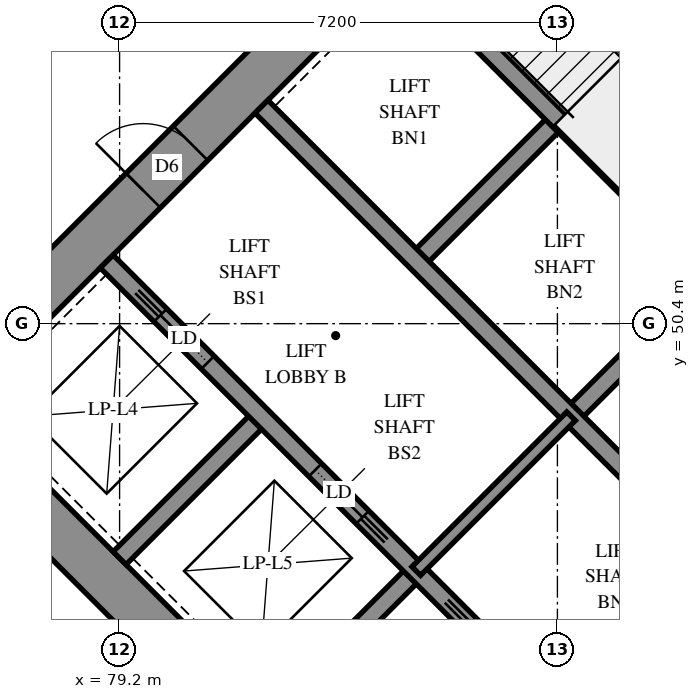
"""IFC4 building model, lengths in metres.
Left out: names, types, materials, properties, quantities, classifications, styles, units other than length and angle.
Written with IfcOpenShell. Run it as: python <this file> out.ifc"""

import sys

from ifc_helpers import new_model, si_unit, direction, frame, frame_2d, origin, place, context, subcontext, project, spatial, rectangle, extrude, element, fill, save


model = new_model("IFC4")
c1 = context("Model", 3, precision=1e-05, world=origin(), true_north=direction((0.0, 1.0)))
c2 = subcontext(c1, "Body", "Model", "MODEL_VIEW")
j1 = project(units=[si_unit("LENGTHUNIT", "METRE"), si_unit("PLANEANGLEUNIT", "RADIAN")], contexts=[c1])
p1 = place(None, origin())
s1 = spatial("IfcSite", under=j1, at=p1, CompositionType="ELEMENT")
p2 = place(p1, origin())
s2 = spatial("IfcBuilding", under=s1, at=p2, CompositionType="ELEMENT")
p3 = place(p2, frame((0.0, 0.0, 84.6)))
s3 = spatial("IfcBuildingStorey", under=s2, at=p3, CompositionType="ELEMENT", Elevation=84.6)
p4 = place(p3, frame((75.806, 49.373, -0.3), z_axis=(0.0, 0.0, 1.0), x_axis=(0.7071067812, -0.7071067812, 0.0)))
e1 = element("IfcWall", 1, at=p4, inside=s3, PredefinedType="SHEAR", context=c2, shape_type="SweptSolid", body=[
    extrude(rectangle(XDim=16.0, YDim=0.8, at=frame_2d((8.0, 0.0))), origin(), (0.0, 0.0, 1.0), 2.7),
])
p5 = place(p3, frame((86.554, 60.121, -0.3), z_axis=(0.0, 0.0, 1.0), x_axis=(0.7071067812, -0.7071067812, 0.0)))
e2 = element("IfcWall", 2, at=p5, inside=s3, PredefinedType="SHEAR", context=c2, shape_type="SweptSolid", body=[
    extrude(rectangle(XDim=16.0, YDim=0.8, at=frame_2d((8.0, 0.0))), origin(), (0.0, 0.0, 1.0), 2.7),
])
p6 = place(p5, frame((10.8, 0.0, 0.3)))
e3 = element("IfcOpeningElement", 3, at=p6, cuts=e2, PredefinedType="OPENING", context=c2, shape_type="SweptSolid", body=[
    extrude(rectangle(XDim=0.8, YDim=2.1, at=frame_2d((0.4, 1.05))), frame((0.0, 0.41, 0.0), z_axis=(0.0, -1.0, 0.0), x_axis=(1.0, 0.0, 0.0)), (0.0, 0.0, 1.0), 0.82),
])
p7 = place(p3, frame((76.372, 49.373, -0.3), z_axis=(0.0, 0.0, 1.0), x_axis=(0.7071067812, 0.7071067812, 0.0)))
e4 = element("IfcWall", 4, at=p7, inside=s3, PredefinedType="SHEAR", context=c2, shape_type="SweptSolid", body=[
    extrude(rectangle(XDim=14.4, YDim=0.8, at=frame_2d((7.2, 0.0))), origin(), (0.0, 0.0, 1.0), 2.7),
])
p8 = place(p7, frame((4.55, 0.0, 0.3)))
e5 = element("IfcOpeningElement", 5, at=p8, cuts=e4, PredefinedType="OPENING", context=c2, shape_type="SweptSolid", body=[
    extrude(rectangle(XDim=1.1, YDim=2.1, at=frame_2d((0.55, 1.05))), frame((0.0, 0.41, 0.0), z_axis=(0.0, -1.0, 0.0), x_axis=(1.0, 0.0, 0.0)), (0.0, 0.0, 1.0), 0.82),
])
p9 = place(p7, frame((11.35, 0.0, 0.3)))
e6 = element("IfcOpeningElement", 6, at=p9, cuts=e4, PredefinedType="OPENING", context=c2, shape_type="SweptSolid", body=[
    extrude(rectangle(XDim=1.1, YDim=2.1, at=frame_2d((0.55, 1.05))), frame((0.0, 0.41, 0.0), z_axis=(0.0, -1.0, 0.0), x_axis=(1.0, 0.0, 0.0)), (0.0, 0.0, 1.0), 0.82),
])
p10 = place(p3, frame((87.12, 38.625, -0.3), z_axis=(0.0, 0.0, 1.0), x_axis=(0.7071067812, 0.7071067812, 0.0)))
e7 = element("IfcWall", 7, at=p10, inside=s3, PredefinedType="SHEAR", context=c2, shape_type="SweptSolid", body=[
    extrude(rectangle(XDim=14.4, YDim=0.8, at=frame_2d((7.2, 0.0))), origin(), (0.0, 0.0, 1.0), 2.7),
])
p11 = place(p10, frame((4.55, 0.0, 0.3)))
e8 = element("IfcOpeningElement", 8, at=p11, cuts=e7, PredefinedType="OPENING", context=c2, shape_type="SweptSolid", body=[
    extrude(rectangle(XDim=1.1, YDim=2.1, at=frame_2d((0.55, 1.05))), frame((0.0, 0.41, 0.0), z_axis=(0.0, -1.0, 0.0), x_axis=(1.0, 0.0, 0.0)), (0.0, 0.0, 1.0), 0.82),
])
p12 = place(p10, frame((11.35, 0.0, 0.3)))
e9 = element("IfcOpeningElement", 9, at=p12, cuts=e7, PredefinedType="OPENING", context=c2, shape_type="SweptSolid", body=[
    extrude(rectangle(XDim=1.1, YDim=2.1, at=frame_2d((0.55, 1.05))), frame((0.0, 0.41, 0.0), z_axis=(0.0, -1.0, 0.0), x_axis=(1.0, 0.0, 0.0)), (0.0, 0.0, 1.0), 0.82),
])
for number, where, z_axis, x_axis in (
    (10, (79.2, 46.544, 0.0), (0.0, 0.0, 1.0), (0.707, 0.707, 0.0)),
    (11, (84.079, 51.423, 0.0), (0.0, 0.0, 1.0), (0.707, 0.707, 0.0)),
):
    element("IfcWall", number, at=place(p3, frame(where, z_axis=z_axis, x_axis=x_axis)), inside=s3, PredefinedType="SOLIDWALL", context=c2, shape_type="SweptSolid", body=[
        extrude(rectangle(XDim=3.3, YDim=0.3, at=frame_2d((1.65, 0.0))), origin(), (0.0, 0.0, 1.0), 3.1),
    ])
p13 = place(p3, frame((81.746, 43.999, 0.0), z_axis=(0.0, 0.0, 1.0), x_axis=(0.7071067812, 0.7071067812, 0.0)))
e12 = element("IfcWall", 12, at=p13, inside=s3, PredefinedType="SOLIDWALL", context=c2, shape_type="SweptSolid", body=[
    extrude(rectangle(XDim=3.3, YDim=0.3, at=frame_2d((1.65, 0.0))), origin(), (0.0, 0.0, 1.0), 3.1),
])
p14 = place(p3, frame((86.625, 48.878, 0.0), z_axis=(0.0, 0.0, 1.0), x_axis=(0.7071067812, 0.7071067812, 0.0)))
e13 = element("IfcWall", 13, at=p14, inside=s3, PredefinedType="SOLIDWALL", context=c2, shape_type="SweptSolid", body=[
    extrude(rectangle(XDim=3.3, YDim=0.3, at=frame_2d((1.65, 0.0))), origin(), (0.0, 0.0, 1.0), 3.1),
])
p15 = place(p3, frame((78.988, 51.423, 0.0), z_axis=(0.0, 0.0, 1.0), x_axis=(0.7071067812, -0.7071067812, 0.0)))
e14 = element("IfcWall", 14, at=p15, inside=s3, PredefinedType="SOLIDWALL", context=c2, shape_type="SweptSolid", body=[
    extrude(rectangle(XDim=14.4, YDim=0.3, at=frame_2d((7.2, 0.0))), origin(), (0.0, 0.0, 1.0), 3.1),
])
p16 = place(p15, frame((1.25, 0.0, 0.0)))
e15 = element("IfcOpeningElement", 15, at=p16, cuts=e14, PredefinedType="OPENING", context=c2, shape_type="SweptSolid", body=[
    extrude(rectangle(XDim=1.1, YDim=2.1, at=frame_2d((0.55, 1.05))), frame((0.0, 0.16, 0.0), z_axis=(0.0, -1.0, 0.0), x_axis=(1.0, 0.0, 0.0)), (0.0, 0.0, 1.0), 0.32),
])
p17 = place(p15, frame((4.85, 0.0, 0.0)))
e16 = element("IfcOpeningElement", 16, at=p17, cuts=e14, PredefinedType="OPENING", context=c2, shape_type="SweptSolid", body=[
    extrude(rectangle(XDim=1.1, YDim=2.1, at=frame_2d((0.55, 1.05))), frame((0.0, 0.16, 0.0), z_axis=(0.0, -1.0, 0.0), x_axis=(1.0, 0.0, 0.0)), (0.0, 0.0, 1.0), 0.32),
])
p18 = place(p15, frame((8.45, 0.0, 0.0)))
e17 = element("IfcOpeningElement", 17, at=p18, cuts=e14, PredefinedType="OPENING", context=c2, shape_type="SweptSolid", body=[
    extrude(rectangle(XDim=1.1, YDim=2.1, at=frame_2d((0.55, 1.05))), frame((0.0, 0.16, 0.0), z_axis=(0.0, -1.0, 0.0), x_axis=(1.0, 0.0, 0.0)), (0.0, 0.0, 1.0), 0.32),
])
p19 = place(p15, frame((12.05, 0.0, 0.0)))
e18 = element("IfcOpeningElement", 18, at=p19, cuts=e14, PredefinedType="OPENING", context=c2, shape_type="SweptSolid", body=[
    extrude(rectangle(XDim=1.1, YDim=2.1, at=frame_2d((0.55, 1.05))), frame((0.0, 0.16, 0.0), z_axis=(0.0, -1.0, 0.0), x_axis=(1.0, 0.0, 0.0)), (0.0, 0.0, 1.0), 0.32),
])
p20 = place(p3, frame((81.534, 53.969, 0.0), z_axis=(0.0, 0.0, 1.0), x_axis=(0.707103309, -0.7071102534, 0.0)))
e19 = element("IfcWall", 19, at=p20, inside=s3, PredefinedType="SOLIDWALL", context=c2, shape_type="SweptSolid", body=[
    extrude(rectangle(XDim=14.4, YDim=0.3, at=frame_2d((7.2, 0.0))), origin(), (0.0, 0.0, 1.0), 3.1),
])
p21 = place(p20, frame((12.05, 0.0, 0.0)))
e20 = element("IfcOpeningElement", 20, at=p21, cuts=e19, PredefinedType="OPENING", context=c2, shape_type="SweptSolid", body=[
    extrude(rectangle(XDim=1.1, YDim=2.1, at=frame_2d((0.55, 1.05))), frame((0.0, 0.16, 0.0), z_axis=(0.0, -1.0, 0.0), x_axis=(1.0, 0.0, 0.0)), (0.0, 0.0, 1.0), 0.32),
])
p22 = place(p3, frame((83.867, 56.302, 0.0), z_axis=(0.0, 0.0, 1.0), x_axis=(0.7071137256, -0.7070998367, 0.0)))
e21 = element("IfcWall", 21, at=p22, inside=s3, PredefinedType="SOLIDWALL", context=c2, shape_type="SweptSolid", body=[
    extrude(rectangle(XDim=7.2, YDim=0.3, at=frame_2d((3.6, 0.0))), origin(), (0.0, 0.0, 1.0), 3.1),
])
p23 = place(p3, frame((84.079, 46.332, 0.0), z_axis=(0.0, 0.0, 1.0), x_axis=(0.7071067812, 0.7071067812, 0.0)))
e22 = element("IfcWall", 22, at=p23, inside=s3, PredefinedType="PARTITIONING", context=c2, shape_type="SweptSolid", body=[
    extrude(rectangle(XDim=3.6, YDim=0.2, at=frame_2d((1.8, 0.0))), origin(), (0.0, 0.0, 1.0), 3.1),
])
p24 = place(p8, origin())
e23 = element("IfcDoor", 23, at=p24, inside=s3, OperationType="DOUBLE_DOOR_SINGLE_SWING", PredefinedType="DOOR", context=c2, shape_type="SweptSolid", body=[
    extrude(rectangle(XDim=1.1, YDim=2.1, at=frame_2d((0.55, 1.05))), frame((0.0, 0.025, 0.0), z_axis=(0.0, -1.0, 0.0), x_axis=(1.0, 0.0, 0.0)), (0.0, 0.0, 1.0), 0.05),
])
fill(e5, e23)
p25 = place(p16, origin())
e24 = element("IfcDoor", 24, at=p25, inside=s3, OperationType="SLIDING_TO_LEFT", PredefinedType="DOOR", context=c2, shape_type="SweptSolid", body=[
    extrude(rectangle(XDim=1.1, YDim=2.1, at=frame_2d((0.55, 1.05))), frame((0.0, 0.025, 0.0), z_axis=(0.0, -1.0, 0.0), x_axis=(1.0, 0.0, 0.0)), (0.0, 0.0, 1.0), 0.05),
])
fill(e15, e24)
p26 = place(p17, origin())
e25 = element("IfcDoor", 25, at=p26, inside=s3, OperationType="SLIDING_TO_RIGHT", PredefinedType="DOOR", context=c2, shape_type="SweptSolid", body=[
    extrude(rectangle(XDim=1.1, YDim=2.1, at=frame_2d((0.55, 1.05))), frame((0.0, 0.025, 0.0), z_axis=(0.0, -1.0, 0.0), x_axis=(1.0, 0.0, 0.0)), (0.0, 0.0, 1.0), 0.05),
])
fill(e16, e25)
save(model, sys.argv[1])
